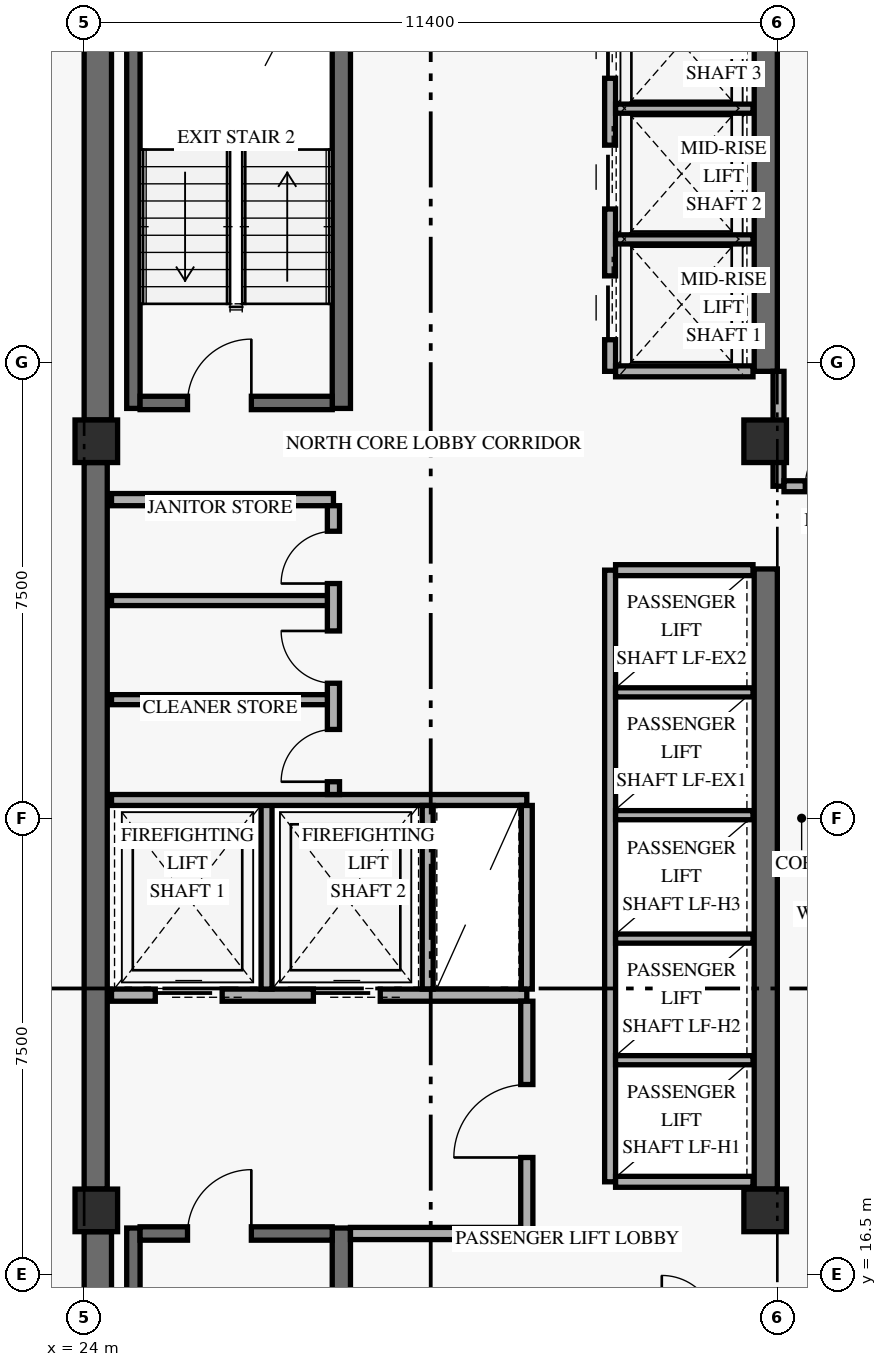
"""IFC4 building model, lengths in metres.
Left out: names, types, materials, properties, quantities, classifications, styles, units other than length and angle.
Written with IfcOpenShell. Run it as: python <this file> out.ifc"""

import sys

from ifc_helpers import new_model, si_unit, direction, frame, frame_2d, origin, origin_2d, place, context, subcontext, project, spatial, rectangle, extrude, element, fill, save


model = new_model("IFC4")
c1 = context("Model", 3, precision=1e-05, world=origin(), true_north=direction((0.0, 1.0)))
c2 = subcontext(c1, "Body", "Model", "MODEL_VIEW")
j1 = project(units=[si_unit("LENGTHUNIT", "METRE"), si_unit("PLANEANGLEUNIT", "RADIAN")], contexts=[c1])
p1 = place(None, origin())
s1 = spatial("IfcSite", under=j1, at=p1, CompositionType="ELEMENT")
p2 = place(p1, origin())
s2 = spatial("IfcBuilding", under=s1, at=p2, CompositionType="ELEMENT")
p3 = place(p2, frame((0.0, 0.0, 141.0)))
s3 = spatial("IfcBuildingStorey", under=s2, at=p3, CompositionType="ELEMENT", Elevation=141.0)
p4 = place(p3, frame((24.225, 9.6, 0.0), z_axis=(0.0, 0.0, 1.0), x_axis=(0.0, 1.0, 0.0)))
e1 = element("IfcWall", 1, at=p4, inside=s3, PredefinedType="SHEAR", context=c2, shape_type="SweptSolid", body=[
    extrude(rectangle(XDim=7.6, YDim=0.45, at=frame_2d((3.8, 0.0))), origin(), (0.0, 0.0, 1.0), 2.748),
])
p5 = place(p3, frame((24.19, 17.9, 0.0), z_axis=(0.0, 0.0, 1.0), x_axis=(0.0, 1.0, 0.0)))
e2 = element("IfcWall", 2, at=p5, inside=s3, PredefinedType="SHEAR", context=c2, shape_type="SweptSolid", body=[
    extrude(rectangle(XDim=11.95, YDim=0.38, at=frame_2d((5.975, 0.0))), origin(), (0.0, 0.0, 1.0), 2.748),
])
p6 = place(p3, frame((24.225, 30.55, 0.0), z_axis=(0.0, 0.0, 1.0), x_axis=(0.0, 1.0, 0.0)))
e3 = element("IfcWall", 3, at=p6, inside=s3, PredefinedType="SHEAR", context=c2, shape_type="SweptSolid", body=[
    extrude(rectangle(XDim=7.85, YDim=0.45, at=frame_2d((3.925, 0.0))), origin(), (0.0, 0.0, 1.0), 2.748),
])
p7 = place(p3, frame((35.21, 17.9, 0.0), z_axis=(0.0, 0.0, 1.0), x_axis=(0.0, 1.0, 0.0)))
e4 = element("IfcWall", 4, at=p7, inside=s3, PredefinedType="SHEAR", context=c2, shape_type="SweptSolid", body=[
    extrude(rectangle(XDim=10.2, YDim=0.38, at=frame_2d((5.1, 0.0))), origin(), (0.0, 0.0, 1.0), 2.748),
])
p8 = place(p3, frame((35.21, 31.35, 0.0), z_axis=(0.0, 0.0, 1.0), x_axis=(0.0, 1.0, 0.0)))
e5 = element("IfcWall", 5, at=p8, inside=s3, PredefinedType="SHEAR", context=c2, shape_type="SweptSolid", body=[
    extrude(rectangle(XDim=7.05, YDim=0.38, at=frame_2d((3.525, 0.0))), origin(), (0.0, 0.0, 1.0), 2.748),
])
p9 = place(p3, frame((24.81, 9.5, 0.0), z_axis=(0.0, 0.0, 1.0), x_axis=(0.0, 1.0, 0.0)))
e6 = element("IfcWall", 6, at=p9, inside=s3, PredefinedType="SHEAR", context=c2, shape_type="SweptSolid", body=[
    extrude(rectangle(XDim=7.76, YDim=0.22, at=frame_2d((3.88, 0.0))), origin(), (0.0, 0.0, 1.0), 3.36),
])
p10 = place(p3, frame((28.23, 9.5, 0.0), z_axis=(0.0, 0.0, 1.0), x_axis=(0.0, 1.0, 0.0)))
e7 = element("IfcWall", 7, at=p10, inside=s3, PredefinedType="SHEAR", context=c2, shape_type="SweptSolid", body=[
    extrude(rectangle(XDim=7.76, YDim=0.3, at=frame_2d((3.88, 0.0))), origin(), (0.0, 0.0, 1.0), 3.36),
])
p11 = place(p3, frame((24.92, 17.17, 0.0), z_axis=(0.0, 0.0, 1.0), x_axis=(1.0, 0.0, 0.0)))
e8 = element("IfcWall", 8, at=p11, inside=s3, PredefinedType="SHEAR", context=c2, shape_type="SweptSolid", body=[
    extrude(rectangle(XDim=3.16, YDim=0.22, at=frame_2d((1.58, 0.0))), origin(), (0.0, 0.0, 1.0), 3.36),
])
p12 = place(p11, frame((0.78, 0.0, 0.0)))
e9 = element("IfcOpeningElement", 9, at=p12, cuts=e8, PredefinedType="OPENING", context=c2, shape_type="SweptSolid", body=[
    extrude(rectangle(XDim=1.05, YDim=2.15, at=frame_2d((0.525, 1.075))), frame((0.0, 0.12, 0.0), z_axis=(0.0, -1.0, 0.0), x_axis=(1.0, 0.0, 0.0)), (0.0, 0.0, 1.0), 0.24),
])
p13 = place(p3, frame((24.81, 30.74, 0.0), z_axis=(0.0, 0.0, 1.0), x_axis=(0.0, 1.0, 0.0)))
e10 = element("IfcWall", 10, at=p13, inside=s3, PredefinedType="SHEAR", context=c2, shape_type="SweptSolid", body=[
    extrude(rectangle(XDim=7.76, YDim=0.22, at=frame_2d((3.88, 0.0))), origin(), (0.0, 0.0, 1.0), 3.36),
])
p14 = place(p3, frame((28.23, 30.74, 0.0), z_axis=(0.0, 0.0, 1.0), x_axis=(0.0, 1.0, 0.0)))
e11 = element("IfcWall", 11, at=p14, inside=s3, PredefinedType="SHEAR", context=c2, shape_type="SweptSolid", body=[
    extrude(rectangle(XDim=7.76, YDim=0.3, at=frame_2d((3.88, 0.0))), origin(), (0.0, 0.0, 1.0), 3.36),
])
p15 = place(p3, frame((24.92, 30.83, 0.0), z_axis=(0.0, 0.0, 1.0), x_axis=(1.0, 0.0, 0.0)))
e12 = element("IfcWall", 12, at=p15, inside=s3, PredefinedType="SHEAR", context=c2, shape_type="SweptSolid", body=[
    extrude(rectangle(XDim=3.16, YDim=0.22, at=frame_2d((1.58, 0.0))), origin(), (0.0, 0.0, 1.0), 3.36),
])
p16 = place(p15, frame((0.78, 0.0, 0.0)))
e13 = element("IfcOpeningElement", 13, at=p16, cuts=e12, PredefinedType="OPENING", context=c2, shape_type="SweptSolid", body=[
    extrude(rectangle(XDim=1.05, YDim=2.15, at=frame_2d((0.525, 1.075))), frame((0.0, 0.12, 0.0), z_axis=(0.0, -1.0, 0.0), x_axis=(1.0, 0.0, 0.0)), (0.0, 0.0, 1.0), 0.24),
])
for number, where, z_axis, x_axis in (
    (14, (24.2, 17.55, 0.0), (0.0, 0.0, 1.0), (1.0, 0.0, 0.0)),
    (15, (24.2, 30.2, 0.0), (0.0, 0.0, 1.0), (1.0, 0.0, 0.0)),
    (16, (35.2, 17.55, 0.0), (0.0, 0.0, 1.0), (1.0, 0.0, 0.0)),
    (17, (35.2, 30.2, 0.0), (0.0, 0.0, 1.0), (1.0, 0.0, 0.0)),
):
    element("IfcColumn", number, at=place(p3, frame(where, z_axis=z_axis, x_axis=x_axis)), inside=s3, PredefinedType="COLUMN", context=c2, shape_type="SweptSolid", body=[
        extrude(rectangle(XDim=0.7, YDim=0.7, at=origin_2d()), origin(), (0.0, 0.0, 1.0), 3.6),
    ])
p17 = place(p3, frame((24.45, 21.09, 0.0), z_axis=(0.0, 0.0, 1.0), x_axis=(1.0, 0.0, 0.0)))
e18 = element("IfcWall", 18, at=p17, inside=s3, PredefinedType="STANDARD", context=c2, shape_type="SweptSolid", body=[
    extrude(rectangle(XDim=6.83, YDim=0.2, at=frame_2d((3.415, 0.0))), origin(), (0.0, 0.0, 1.0), 3.36),
])
p18 = place(p17, frame((0.72, 0.0, 0.0)))
e19 = element("IfcOpeningElement", 19, at=p18, cuts=e18, PredefinedType="OPENING", context=c2, shape_type="SweptSolid", body=[
    extrude(rectangle(XDim=1.1, YDim=2.2, at=frame_2d((0.55, 1.1))), frame((0.0, 0.11, 0.0), z_axis=(0.0, -1.0, 0.0), x_axis=(1.0, 0.0, 0.0)), (0.0, 0.0, 1.0), 0.22),
])
p19 = place(p17, frame((3.32, 0.0, 0.0)))
e20 = element("IfcOpeningElement", 20, at=p19, cuts=e18, PredefinedType="OPENING", context=c2, shape_type="SweptSolid", body=[
    extrude(rectangle(XDim=1.1, YDim=2.2, at=frame_2d((0.55, 1.1))), frame((0.0, 0.11, 0.0), z_axis=(0.0, -1.0, 0.0), x_axis=(1.0, 0.0, 0.0)), (0.0, 0.0, 1.0), 0.22),
])
p20 = place(p3, frame((28.38, 17.17, 0.0), z_axis=(0.0, 0.0, 1.0), x_axis=(1.0, 0.0, 0.0)))
e21 = element("IfcWall", 21, at=p20, inside=s3, PredefinedType="STANDARD", context=c2, shape_type="SweptSolid", body=[
    extrude(rectangle(XDim=2.9, YDim=0.2, at=frame_2d((1.45, 0.0))), origin(), (0.0, 0.0, 1.0), 3.36),
])
p21 = place(p3, frame((31.28, 17.07, 0.0), z_axis=(0.0, 0.0, 1.0), x_axis=(0.0, 1.0, 0.0)))
e22 = element("IfcWall", 22, at=p21, inside=s3, PredefinedType="STANDARD", context=c2, shape_type="SweptSolid", body=[
    extrude(rectangle(XDim=3.92, YDim=0.2, at=frame_2d((1.96, 0.0))), origin(), (0.0, 0.0, 1.0), 2.73),
])
p22 = place(p21, frame((1.35, 0.0, 0.0)))
e23 = element("IfcOpeningElement", 23, at=p22, cuts=e22, PredefinedType="OPENING", context=c2, shape_type="SweptSolid", body=[
    extrude(rectangle(XDim=1.2, YDim=2.15, at=frame_2d((0.6, 1.075))), frame((0.0, 0.11, 0.0), z_axis=(0.0, -1.0, 0.0), x_axis=(1.0, 0.0, 0.0)), (0.0, 0.0, 1.0), 0.22),
])
p23 = place(p3, frame((27.0, 21.19, 0.0), z_axis=(0.0, 0.0, 1.0), x_axis=(0.0, 1.0, 0.0)))
e24 = element("IfcWall", 24, at=p23, inside=s3, PredefinedType="STANDARD", context=c2, shape_type="SweptSolid", body=[
    extrude(rectangle(XDim=3.11, YDim=0.18, at=frame_2d((1.555, 0.0))), origin(), (0.0, 0.0, 1.0), 3.36),
])
p24 = place(p3, frame((24.45, 24.3, 0.0), z_axis=(0.0, 0.0, 1.0), x_axis=(1.0, 0.0, 0.0)))
e25 = element("IfcWall", 25, at=p24, inside=s3, PredefinedType="STANDARD", context=c2, shape_type="SweptSolid", body=[
    extrude(rectangle(XDim=6.83, YDim=0.18, at=frame_2d((3.415, 0.0))), origin(), (0.0, 0.0, 1.0), 3.36),
])
for number, where, z_axis, x_axis in (
    (26, (29.65, 21.19, 0.0), (0.0, 0.0, 1.0), (0.0, 1.0, 0.0)),
    (27, (31.28, 21.19, 0.0), (0.0, 0.0, 1.0), (0.0, 1.0, 0.0)),
):
    element("IfcWall", number, at=place(p3, frame(where, z_axis=z_axis, x_axis=x_axis)), inside=s3, PredefinedType="STANDARD", context=c2, shape_type="SweptSolid", body=[
        extrude(rectangle(XDim=3.02, YDim=0.18, at=frame_2d((1.51, 0.0))), origin(), (0.0, 0.0, 1.0), 3.36),
    ])
p25 = place(p3, frame((24.45, 29.24, 0.0), z_axis=(0.0, 0.0, 1.0), x_axis=(1.0, 0.0, 0.0)))
e28 = element("IfcWall", 28, at=p25, inside=s3, PredefinedType="STANDARD", context=c2, shape_type="SweptSolid", body=[
    extrude(rectangle(XDim=3.65, YDim=0.2, at=frame_2d((1.825, 0.0))), origin(), (0.0, 0.0, 1.0), 3.36),
])
p26 = place(p3, frame((28.1, 24.39, 0.0), z_axis=(0.0, 0.0, 1.0), x_axis=(0.0, 1.0, 0.0)))
e29 = element("IfcWall", 29, at=p26, inside=s3, PredefinedType="STANDARD", context=c2, shape_type="SweptSolid", body=[
    extrude(rectangle(XDim=4.75, YDim=0.2, at=frame_2d((2.375, 0.0))), origin(), (0.0, 0.0, 1.0), 3.36),
])
p27 = place(p26, frame((0.21, 0.0, 0.0)))
e30 = element("IfcOpeningElement", 30, at=p27, cuts=e29, PredefinedType="OPENING", context=c2, shape_type="SweptSolid", body=[
    extrude(rectangle(XDim=0.86, YDim=2.1, at=frame_2d((0.43, 1.05))), frame((0.0, 0.11, 0.0), z_axis=(0.0, -1.0, 0.0), x_axis=(1.0, 0.0, 0.0)), (0.0, 0.0, 1.0), 0.22),
])
p28 = place(p26, frame((1.83, 0.0, 0.0)))
e31 = element("IfcOpeningElement", 31, at=p28, cuts=e29, PredefinedType="OPENING", context=c2, shape_type="SweptSolid", body=[
    extrude(rectangle(XDim=0.86, YDim=2.1, at=frame_2d((0.43, 1.05))), frame((0.0, 0.11, 0.0), z_axis=(0.0, -1.0, 0.0), x_axis=(1.0, 0.0, 0.0)), (0.0, 0.0, 1.0), 0.22),
])
p29 = place(p26, frame((3.47, 0.0, 0.0)))
e32 = element("IfcOpeningElement", 32, at=p29, cuts=e29, PredefinedType="OPENING", context=c2, shape_type="SweptSolid", body=[
    extrude(rectangle(XDim=0.86, YDim=2.1, at=frame_2d((0.43, 1.05))), frame((0.0, 0.11, 0.0), z_axis=(0.0, -1.0, 0.0), x_axis=(1.0, 0.0, 0.0)), (0.0, 0.0, 1.0), 0.22),
])
for number, where, z_axis, x_axis in (
    (33, (24.45, 25.95, 0.0), (0.0, 0.0, 1.0), (1.0, 0.0, 0.0)),
    (34, (24.45, 27.58, 0.0), (0.0, 0.0, 1.0), (1.0, 0.0, 0.0)),
):
    element("IfcWall", number, at=place(p3, frame(where, z_axis=z_axis, x_axis=x_axis)), inside=s3, PredefinedType="PARTITIONING", context=c2, shape_type="SweptSolid", body=[
        extrude(rectangle(XDim=3.55, YDim=0.165, at=frame_2d((1.775, 0.0))), origin(), (0.0, 0.0, 1.0), 3.36),
    ])
p30 = place(p3, frame((32.65, 18.02, 0.0), z_axis=(0.0, 0.0, 1.0), x_axis=(0.0, 1.0, 0.0)))
e35 = element("IfcWall", 35, at=p30, inside=s3, PredefinedType="STANDARD", context=c2, shape_type="SweptSolid", body=[
    extrude(rectangle(XDim=10.06, YDim=0.18, at=frame_2d((5.03, 0.0))), origin(), (0.0, 0.0, 1.0), 3.36),
])
for number, where, z_axis, x_axis in (
    (36, (32.74, 18.02, 0.0), (0.0, 0.0, 1.0), (1.0, 0.0, 0.0)),
    (37, (32.74, 28.08, 0.0), (0.0, 0.0, 1.0), (1.0, 0.0, 0.0)),
):
    element("IfcWall", number, at=place(p3, frame(where, z_axis=z_axis, x_axis=x_axis)), inside=s3, PredefinedType="STANDARD", context=c2, shape_type="SweptSolid", body=[
        extrude(rectangle(XDim=2.26, YDim=0.18, at=frame_2d((1.13, 0.0))), origin(), (0.0, 0.0, 1.0), 3.36),
    ])
for number, where, z_axis, x_axis in (
    (38, (32.74, 20.02, 0.0), (0.0, 0.0, 1.0), (1.0, 0.0, 0.0)),
    (39, (32.74, 22.02, 0.0), (0.0, 0.0, 1.0), (1.0, 0.0, 0.0)),
    (40, (32.74, 24.05, 0.0), (0.0, 0.0, 1.0), (1.0, 0.0, 0.0)),
    (41, (32.74, 26.07, 0.0), (0.0, 0.0, 1.0), (1.0, 0.0, 0.0)),
):
    element("IfcWall", number, at=place(p3, frame(where, z_axis=z_axis, x_axis=x_axis)), inside=s3, PredefinedType="STANDARD", context=c2, shape_type="SweptSolid", body=[
        extrude(rectangle(XDim=2.26, YDim=0.15, at=frame_2d((1.13, 0.0))), origin(), (0.0, 0.0, 1.0), 3.36),
    ])
p31 = place(p3, frame((32.65, 31.35, 0.0), z_axis=(0.0, 0.0, 1.0), x_axis=(0.0, 1.0, 0.0)))
e42 = element("IfcWall", 42, at=p31, inside=s3, PredefinedType="STANDARD", context=c2, shape_type="SweptSolid", body=[
    extrude(rectangle(XDim=7.21, YDim=0.18, at=frame_2d((3.605, 0.0))), origin(), (0.0, 0.0, 1.0), 3.36),
])
p32 = place(p31, frame((0.52, 0.0, 0.0)))
e43 = element("IfcOpeningElement", 43, at=p32, cuts=e42, PredefinedType="OPENING", context=c2, shape_type="SweptSolid", body=[
    extrude(rectangle(XDim=1.05, YDim=2.2, at=frame_2d((0.525, 1.1))), frame((0.0, 0.1, 0.0), z_axis=(0.0, -1.0, 0.0), x_axis=(1.0, 0.0, 0.0)), (0.0, 0.0, 1.0), 0.2),
])
p33 = place(p31, frame((2.67, 0.0, 0.0)))
e44 = element("IfcOpeningElement", 44, at=p33, cuts=e42, PredefinedType="OPENING", context=c2, shape_type="SweptSolid", body=[
    extrude(rectangle(XDim=1.05, YDim=2.2, at=frame_2d((0.525, 1.1))), frame((0.0, 0.1, 0.0), z_axis=(0.0, -1.0, 0.0), x_axis=(1.0, 0.0, 0.0)), (0.0, 0.0, 1.0), 0.2),
])
p34 = place(p31, frame((4.82, 0.0, 0.0)))
e45 = element("IfcOpeningElement", 45, at=p34, cuts=e42, PredefinedType="OPENING", context=c2, shape_type="SweptSolid", body=[
    extrude(rectangle(XDim=1.05, YDim=2.2, at=frame_2d((0.525, 1.1))), frame((0.0, 0.1, 0.0), z_axis=(0.0, -1.0, 0.0), x_axis=(1.0, 0.0, 0.0)), (0.0, 0.0, 1.0), 0.2),
])
p35 = place(p3, frame((32.74, 31.35, 0.0), z_axis=(0.0, 0.0, 1.0), x_axis=(1.0, 0.0, 0.0)))
e46 = element("IfcWall", 46, at=p35, inside=s3, PredefinedType="STANDARD", context=c2, shape_type="SweptSolid", body=[
    extrude(rectangle(XDim=2.26, YDim=0.18, at=frame_2d((1.13, 0.0))), origin(), (0.0, 0.0, 1.0), 3.36),
])
for number, where, z_axis, x_axis in (
    (47, (32.74, 33.52, 0.0), (0.0, 0.0, 1.0), (1.0, 0.0, 0.0)),
    (48, (32.74, 35.67, 0.0), (0.0, 0.0, 1.0), (1.0, 0.0, 0.0)),
):
    element("IfcWall", number, at=place(p3, frame(where, z_axis=z_axis, x_axis=x_axis)), inside=s3, PredefinedType="STANDARD", context=c2, shape_type="SweptSolid", body=[
        extrude(rectangle(XDim=2.26, YDim=0.15, at=frame_2d((1.13, 0.0))), origin(), (0.0, 0.0, 1.0), 3.36),
    ])
p36 = place(p3, frame((35.42, 29.46, 0.0), z_axis=(0.0, 0.0, 1.0), x_axis=(0.0, 1.0, 0.0)))
e49 = element("IfcWall", 49, at=p36, inside=s3, PredefinedType="STANDARD", context=c2, shape_type="SweptSolid", body=[
    extrude(rectangle(XDim=1.89, YDim=0.18, at=frame_2d((0.945, 0.0))), origin(), (0.0, 0.0, 1.0), 2.73),
])
p37 = place(p3, frame((35.51, 29.46, 0.0), z_axis=(0.0, 0.0, 1.0), x_axis=(1.0, 0.0, 0.0)))
e50 = element("IfcWall", 50, at=p37, inside=s3, PredefinedType="STANDARD", context=c2, shape_type="SweptSolid", body=[
    extrude(rectangle(XDim=16.29, YDim=0.18, at=frame_2d((8.145, 0.0))), origin(), (0.0, 0.0, 1.0), 2.73),
])
p38 = place(p37, frame((0.35, 0.0, 0.0)))
e51 = element("IfcOpeningElement", 51, at=p38, cuts=e50, PredefinedType="OPENING", context=c2, shape_type="SweptSolid", body=[
    extrude(rectangle(XDim=0.92, YDim=2.15, at=frame_2d((0.46, 1.075))), frame((0.0, 0.1, 0.0), z_axis=(0.0, -1.0, 0.0), x_axis=(1.0, 0.0, 0.0)), (0.0, 0.0, 1.0), 0.2),
])
p39 = place(p37, frame((9.988, 0.0, 0.0)))
e52 = element("IfcOpeningElement", 52, at=p39, cuts=e50, PredefinedType="OPENING", context=c2, shape_type="SweptSolid", body=[
    extrude(rectangle(XDim=0.92, YDim=2.15, at=frame_2d((0.46, 1.075))), frame((0.0, 0.1, 0.0), z_axis=(0.0, -1.0, 0.0), x_axis=(1.0, 0.0, 0.0)), (0.0, 0.0, 1.0), 0.2),
])
p40 = place(p12, frame((1.05, 0.0, 0.0), z_axis=(0.0, 0.0, 1.0), x_axis=(-1.0, 0.0, 0.0)))
e53 = element("IfcDoor", 53, at=p40, inside=s3, OperationType="SINGLE_SWING_LEFT", PredefinedType="DOOR", context=c2, shape_type="SweptSolid", body=[
    extrude(rectangle(XDim=1.05, YDim=2.15, at=frame_2d((0.525, 1.075))), frame((0.0, 0.025, 0.0), z_axis=(0.0, -1.0, 0.0), x_axis=(1.0, 0.0, 0.0)), (0.0, 0.0, 1.0), 0.05),
])
fill(e9, e53)
p41 = place(p16, origin())
e54 = element("IfcDoor", 54, at=p41, inside=s3, OperationType="SINGLE_SWING_RIGHT", PredefinedType="DOOR", context=c2, shape_type="SweptSolid", body=[
    extrude(rectangle(XDim=1.05, YDim=2.15, at=frame_2d((0.525, 1.075))), frame((0.0, 0.025, 0.0), z_axis=(0.0, -1.0, 0.0), x_axis=(1.0, 0.0, 0.0)), (0.0, 0.0, 1.0), 0.05),
])
fill(e13, e54)
p42 = place(p18, origin())
e55 = element("IfcDoor", 55, at=p42, inside=s3, OperationType="SLIDING_TO_LEFT", PredefinedType="DOOR", context=c2, shape_type="SweptSolid", body=[
    extrude(rectangle(XDim=1.1, YDim=2.2, at=frame_2d((0.55, 1.1))), frame((0.0, 0.025, 0.0), z_axis=(0.0, -1.0, 0.0), x_axis=(1.0, 0.0, 0.0)), (0.0, 0.0, 1.0), 0.05),
])
fill(e19, e55)
p43 = place(p19, origin())
e56 = element("IfcDoor", 56, at=p43, inside=s3, OperationType="SLIDING_TO_LEFT", PredefinedType="DOOR", context=c2, shape_type="SweptSolid", body=[
    extrude(rectangle(XDim=1.1, YDim=2.2, at=frame_2d((0.55, 1.1))), frame((0.0, 0.025, 0.0), z_axis=(0.0, -1.0, 0.0), x_axis=(1.0, 0.0, 0.0)), (0.0, 0.0, 1.0), 0.05),
])
fill(e20, e56)
p44 = place(p22, origin())
e57 = element("IfcDoor", 57, at=p44, inside=s3, OperationType="SINGLE_SWING_LEFT", PredefinedType="DOOR", context=c2, shape_type="SweptSolid", body=[
    extrude(rectangle(XDim=1.2, YDim=2.15, at=frame_2d((0.6, 1.075))), frame((0.0, 0.025, 0.0), z_axis=(0.0, -1.0, 0.0), x_axis=(1.0, 0.0, 0.0)), (0.0, 0.0, 1.0), 0.05),
])
fill(e23, e57)
p45 = place(p27, origin())
e58 = element("IfcDoor", 58, at=p45, inside=s3, OperationType="SINGLE_SWING_LEFT", PredefinedType="DOOR", context=c2, shape_type="SweptSolid", body=[
    extrude(rectangle(XDim=0.86, YDim=2.1, at=frame_2d((0.43, 1.05))), frame((0.0, 0.025, 0.0), z_axis=(0.0, -1.0, 0.0), x_axis=(1.0, 0.0, 0.0)), (0.0, 0.0, 1.0), 0.05),
])
fill(e30, e58)
p46 = place(p28, origin())
e59 = element("IfcDoor", 59, at=p46, inside=s3, OperationType="SINGLE_SWING_RIGHT", PredefinedType="DOOR", context=c2, shape_type="SweptSolid", body=[
    extrude(rectangle(XDim=0.86, YDim=2.1, at=frame_2d((0.43, 1.05))), frame((0.0, 0.025, 0.0), z_axis=(0.0, -1.0, 0.0), x_axis=(1.0, 0.0, 0.0)), (0.0, 0.0, 1.0), 0.05),
])
fill(e31, e59)
p47 = place(p29, origin())
e60 = element("IfcDoor", 60, at=p47, inside=s3, OperationType="SINGLE_SWING_LEFT", PredefinedType="DOOR", context=c2, shape_type="SweptSolid", body=[
    extrude(rectangle(XDim=0.86, YDim=2.1, at=frame_2d((0.43, 1.05))), frame((0.0, 0.025, 0.0), z_axis=(0.0, -1.0, 0.0), x_axis=(1.0, 0.0, 0.0)), (0.0, 0.0, 1.0), 0.05),
])
fill(e32, e60)
p48 = place(p32, origin())
e61 = element("IfcDoor", 61, at=p48, inside=s3, OperationType="SLIDING_TO_LEFT", PredefinedType="DOOR", context=c2, shape_type="SweptSolid", body=[
    extrude(rectangle(XDim=1.05, YDim=2.2, at=frame_2d((0.525, 1.1))), frame((0.0, 0.025, 0.0), z_axis=(0.0, -1.0, 0.0), x_axis=(1.0, 0.0, 0.0)), (0.0, 0.0, 1.0), 0.05),
])
fill(e43, e61)
p49 = place(p33, origin())
e62 = element("IfcDoor", 62, at=p49, inside=s3, OperationType="SLIDING_TO_LEFT", PredefinedType="DOOR", context=c2, shape_type="SweptSolid", body=[
    extrude(rectangle(XDim=1.05, YDim=2.2, at=frame_2d((0.525, 1.1))), frame((0.0, 0.025, 0.0), z_axis=(0.0, -1.0, 0.0), x_axis=(1.0, 0.0, 0.0)), (0.0, 0.0, 1.0), 0.05),
])
fill(e44, e62)
p50 = place(p34, origin())
e63 = element("IfcDoor", 63, at=p50, inside=s3, OperationType="SLIDING_TO_LEFT", PredefinedType="DOOR", context=c2, shape_type="SweptSolid", body=[
    extrude(rectangle(XDim=1.05, YDim=2.2, at=frame_2d((0.525, 1.1))), frame((0.0, 0.025, 0.0), z_axis=(0.0, -1.0, 0.0), x_axis=(1.0, 0.0, 0.0)), (0.0, 0.0, 1.0), 0.05),
])
fill(e45, e63)
p51 = place(p38, origin())
e64 = element("IfcDoor", 64, at=p51, inside=s3, OperationType="SINGLE_SWING_RIGHT", PredefinedType="DOOR", context=c2, shape_type="SweptSolid", body=[
    extrude(rectangle(XDim=0.92, YDim=2.15, at=frame_2d((0.46, 1.075))), frame((0.0, 0.025, 0.0), z_axis=(0.0, -1.0, 0.0), x_axis=(1.0, 0.0, 0.0)), (0.0, 0.0, 1.0), 0.05),
])
fill(e51, e64)
save(model, sys.argv[1])
